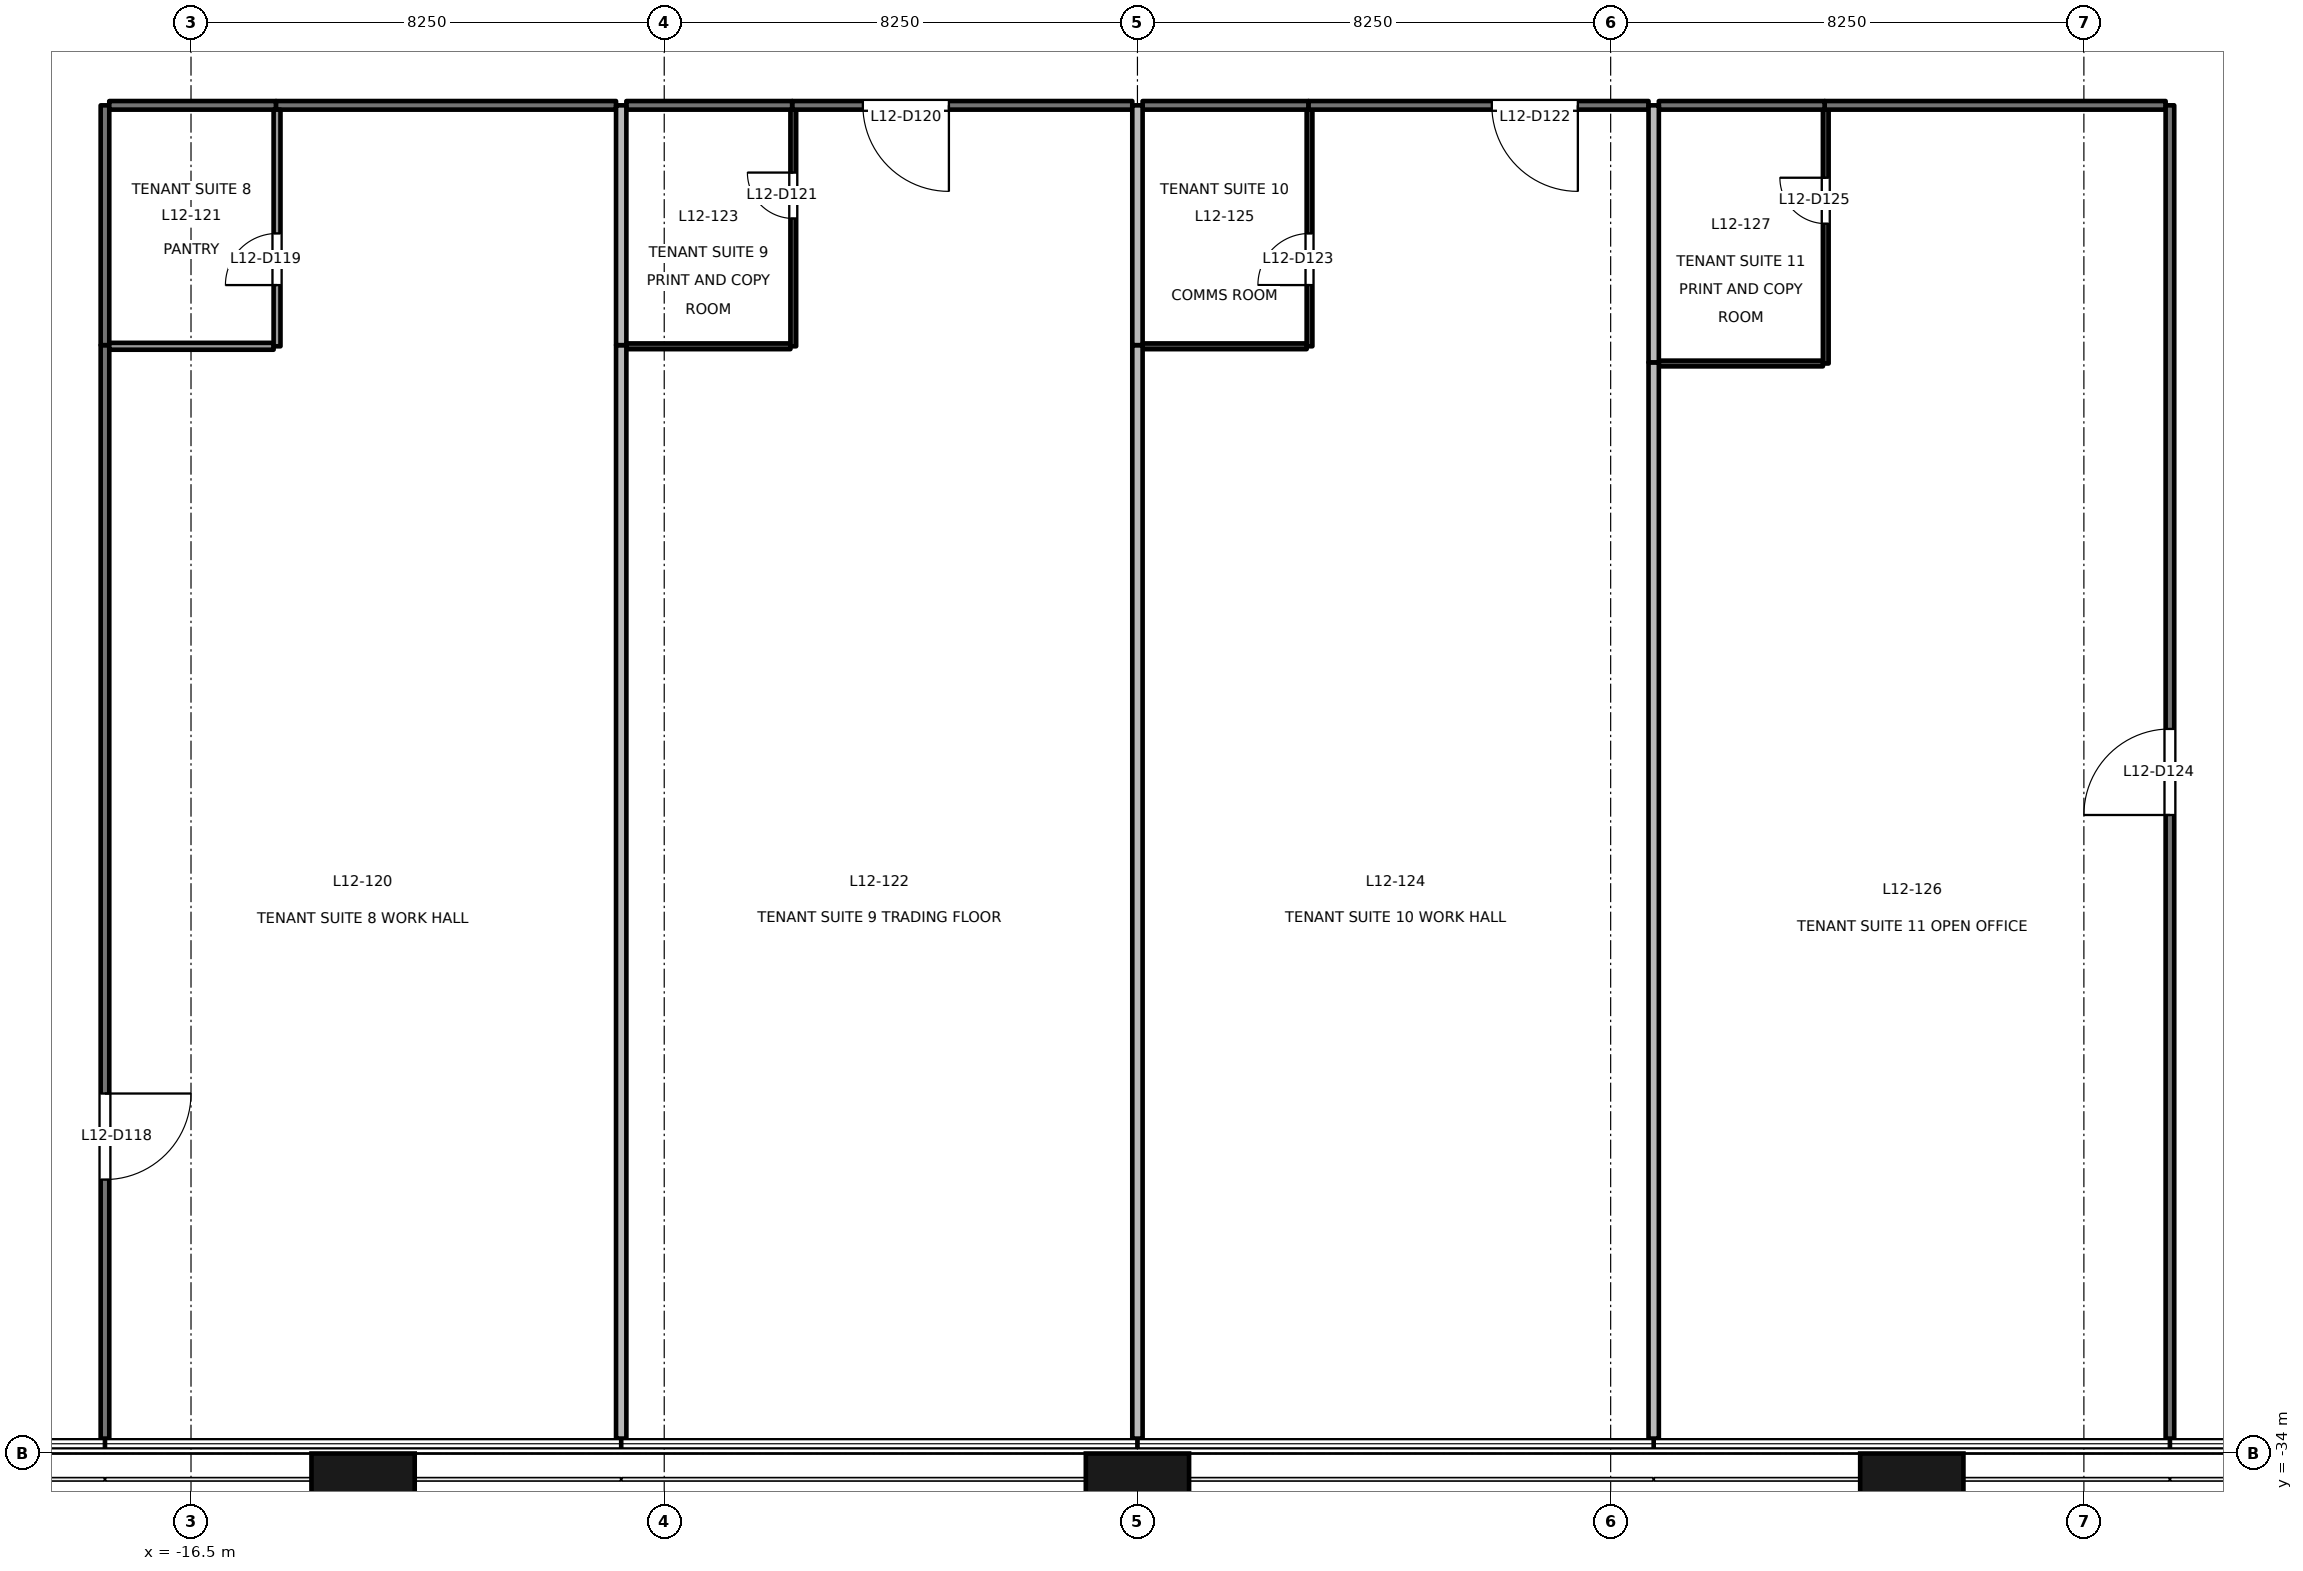
"""IFC4 building model, lengths in metres.
Left out: names, types, materials, properties, quantities, classifications, styles, units other than length and angle.
Written with IfcOpenShell. Run it as: python <this file> out.ifc"""

import sys

from ifc_helpers import new_model, si_unit, direction, frame, frame_2d, origin, origin_2d, place, context, subcontext, project, spatial, rectangle, extrude, element, fill, save


model = new_model("IFC4")
c1 = context("Model", 3, precision=1e-05, world=origin(), true_north=direction((0.0, 1.0)))
c2 = subcontext(c1, "Body", "Model", "MODEL_VIEW")
j1 = project(units=[si_unit("LENGTHUNIT", "METRE"), si_unit("PLANEANGLEUNIT", "RADIAN")], contexts=[c1])
p1 = place(None, origin())
s1 = spatial("IfcSite", under=j1, at=p1, CompositionType="ELEMENT")
p2 = place(p1, origin())
s2 = spatial("IfcBuilding", under=s1, at=p2, CompositionType="ELEMENT")
p3 = place(p2, frame((0.0, 0.0, 57.0)))
s3 = spatial("IfcBuildingStorey", under=s2, at=p3, CompositionType="ELEMENT", Elevation=57.0)
for number, where, z_axis, x_axis in (
    (1, (-13.5, -34.9, -0.2), (0.0, 0.0, 1.0), (1.0, 0.0, 0.0)),
    (2, (0.0, -34.9, -0.2), (0.0, 0.0, 1.0), (1.0, 0.0, 0.0)),
    (3, (13.5, -34.9, -0.2), (0.0, 0.0, 1.0), (1.0, 0.0, 0.0)),
):
    element("IfcColumn", number, at=place(p3, frame(where, z_axis=z_axis, x_axis=x_axis)), inside=s3, PredefinedType="COLUMN", context=c2, shape_type="SweptSolid", body=[
        extrude(rectangle(XDim=1.8, YDim=1.8, at=origin_2d()), origin(), (0.0, 0.0, 1.0), 4.1),
    ])
p4 = place(p3, frame((-18.0, -14.68, 0.0), z_axis=(0.0, 0.0, 1.0), x_axis=(0.0, -1.0, 0.0)))
e4 = element("IfcWall", 4, at=p4, inside=s3, PredefinedType="PARTITIONING", context=c2, shape_type="SweptSolid", body=[
    extrude(rectangle(XDim=19.06, YDim=0.15, at=frame_2d((9.53, 0.0))), origin(), (0.0, 0.0, 1.0), 2.5),
])
p5 = place(p4, frame((13.045, 0.0, 0.0)))
e5 = element("IfcOpeningElement", 5, at=p5, cuts=e4, PredefinedType="OPENING", context=c2, shape_type="SweptSolid", body=[
    extrude(rectangle(XDim=1.5, YDim=2.1, at=frame_2d((0.75, 1.05))), frame((0.0, 0.085, 0.0), z_axis=(0.0, -1.0, 0.0), x_axis=(1.0, 0.0, 0.0)), (0.0, 0.0, 1.0), 0.171),
])
p6 = place(p3, frame((-9.09, -10.5, 0.0), z_axis=(0.0, 0.0, 1.0), x_axis=(-1.0, 0.0, 0.0)))
e6 = element("IfcWall", 6, at=p6, inside=s3, PredefinedType="PARTITIONING", context=c2, shape_type="SweptSolid", body=[
    extrude(rectangle(XDim=5.93, YDim=0.15, at=frame_2d((2.965, 0.0))), origin(), (0.0, 0.0, 1.0), 2.9),
])
p7 = place(p3, frame((-18.0, -10.5, 0.0), z_axis=(0.0, 0.0, 1.0), x_axis=(0.0, -1.0, 0.0)))
e7 = element("IfcWall", 7, at=p7, inside=s3, PredefinedType="PARTITIONING", context=c2, shape_type="SweptSolid", body=[
    extrude(rectangle(XDim=4.18, YDim=0.15, at=frame_2d((2.09, 0.0))), origin(), (0.0, 0.0, 1.0), 2.5),
])
p8 = place(p3, frame((-15.02, -10.5, 0.0), z_axis=(0.0, 0.0, 1.0), x_axis=(-1.0, 0.0, 0.0)))
e8 = element("IfcWall", 8, at=p8, inside=s3, PredefinedType="PARTITIONING", context=c2, shape_type="SweptSolid", body=[
    extrude(rectangle(XDim=2.905, YDim=0.15, at=frame_2d((1.453, 0.0))), origin(), (0.0, 0.0, 1.0), 2.5),
])
p9 = place(p3, frame((-0.09, -10.5, 0.0), z_axis=(0.0, 0.0, 1.0), x_axis=(-1.0, 0.0, 0.0)))
e9 = element("IfcWall", 9, at=p9, inside=s3, PredefinedType="PARTITIONING", context=c2, shape_type="SweptSolid", body=[
    extrude(rectangle(XDim=5.93, YDim=0.15, at=frame_2d((2.965, 0.0))), origin(), (0.0, 0.0, 1.0), 2.9),
])
p10 = place(p9, frame((3.197, 0.0, 0.0)))
e10 = element("IfcOpeningElement", 10, at=p10, cuts=e9, PredefinedType="OPENING", context=c2, shape_type="SweptSolid", body=[
    extrude(rectangle(XDim=1.5, YDim=2.1, at=frame_2d((0.75, 1.05))), frame((0.0, 0.085, 0.0), z_axis=(0.0, -1.0, 0.0), x_axis=(1.0, 0.0, 0.0)), (0.0, 0.0, 1.0), 0.171),
])
p11 = place(p3, frame((-6.02, -10.5, 0.0), z_axis=(0.0, 0.0, 1.0), x_axis=(-1.0, 0.0, 0.0)))
e11 = element("IfcWall", 11, at=p11, inside=s3, PredefinedType="PARTITIONING", context=c2, shape_type="SweptSolid", body=[
    extrude(rectangle(XDim=2.89, YDim=0.15, at=frame_2d((1.445, 0.0))), origin(), (0.0, 0.0, 1.0), 2.9),
])
p12 = place(p3, frame((8.91, -10.5, 0.0), z_axis=(0.0, 0.0, 1.0), x_axis=(-1.0, 0.0, 0.0)))
e12 = element("IfcWall", 12, at=p12, inside=s3, PredefinedType="PARTITIONING", context=c2, shape_type="SweptSolid", body=[
    extrude(rectangle(XDim=5.93, YDim=0.15, at=frame_2d((2.965, 0.0))), origin(), (0.0, 0.0, 1.0), 2.9),
])
p13 = place(p12, frame((1.232, 0.0, 0.0)))
e13 = element("IfcOpeningElement", 13, at=p13, cuts=e12, PredefinedType="OPENING", context=c2, shape_type="SweptSolid", body=[
    extrude(rectangle(XDim=1.5, YDim=2.1, at=frame_2d((0.75, 1.05))), frame((0.0, 0.085, 0.0), z_axis=(0.0, -1.0, 0.0), x_axis=(1.0, 0.0, 0.0)), (0.0, 0.0, 1.0), 0.171),
])
p14 = place(p3, frame((2.98, -10.5, 0.0), z_axis=(0.0, 0.0, 1.0), x_axis=(-1.0, 0.0, 0.0)))
e14 = element("IfcWall", 14, at=p14, inside=s3, PredefinedType="PARTITIONING", context=c2, shape_type="SweptSolid", body=[
    extrude(rectangle(XDim=2.89, YDim=0.15, at=frame_2d((1.445, 0.0))), origin(), (0.0, 0.0, 1.0), 2.9),
])
p15 = place(p3, frame((17.925, -10.5, 0.0), z_axis=(0.0, 0.0, 1.0), x_axis=(-1.0, 0.0, 0.0)))
e15 = element("IfcWall", 15, at=p15, inside=s3, PredefinedType="PARTITIONING", context=c2, shape_type="SweptSolid", body=[
    extrude(rectangle(XDim=5.945, YDim=0.15, at=frame_2d((2.973, 0.0))), origin(), (0.0, 0.0, 1.0), 2.5),
])
p16 = place(p3, frame((18.0, -33.74, 0.0), z_axis=(0.0, 0.0, 1.0), x_axis=(0.0, 1.0, 0.0)))
e16 = element("IfcWall", 16, at=p16, inside=s3, PredefinedType="PARTITIONING", context=c2, shape_type="SweptSolid", body=[
    extrude(rectangle(XDim=23.24, YDim=0.15, at=frame_2d((11.62, 0.0))), origin(), (0.0, 0.0, 1.0), 2.5),
])
p17 = place(p16, frame((10.87, 0.0, 0.0)))
e17 = element("IfcOpeningElement", 17, at=p17, cuts=e16, PredefinedType="OPENING", context=c2, shape_type="SweptSolid", body=[
    extrude(rectangle(XDim=1.5, YDim=2.1, at=frame_2d((0.75, 1.05))), frame((0.0, 0.085, 0.0), z_axis=(0.0, -1.0, 0.0), x_axis=(1.0, 0.0, 0.0)), (0.0, 0.0, 1.0), 0.171),
])
p18 = place(p3, frame((11.98, -10.5, 0.0), z_axis=(0.0, 0.0, 1.0), x_axis=(-1.0, 0.0, 0.0)))
e18 = element("IfcWall", 18, at=p18, inside=s3, PredefinedType="PARTITIONING", context=c2, shape_type="SweptSolid", body=[
    extrude(rectangle(XDim=2.89, YDim=0.15, at=frame_2d((1.445, 0.0))), origin(), (0.0, 0.0, 1.0), 2.9),
])
p19 = place(p3, frame((-17.925, -14.7, 0.0), z_axis=(0.0, 0.0, 1.0), x_axis=(1.0, 0.0, 0.0)))
e19 = element("IfcWall", 19, at=p19, inside=s3, PredefinedType="PARTITIONING", context=c2, shape_type="SweptSolid", body=[
    extrude(rectangle(XDim=2.865, YDim=0.12, at=frame_2d((1.433, 0.0))), origin(), (0.0, 0.0, 1.0), 2.5),
])
p20 = place(p3, frame((-15.0, -14.7, 0.0), z_axis=(0.0, 0.0, 1.0), x_axis=(0.0, 1.0, 0.0)))
e20 = element("IfcWall", 20, at=p20, inside=s3, PredefinedType="PARTITIONING", context=c2, shape_type="SweptSolid", body=[
    extrude(rectangle(XDim=4.125, YDim=0.12, at=frame_2d((2.062, 0.0))), origin(), (0.0, 0.0, 1.0), 3.9),
])
p21 = place(p20, frame((1.067, 0.0, 0.0)))
e21 = element("IfcOpeningElement", 21, at=p21, cuts=e20, PredefinedType="OPENING", context=c2, shape_type="SweptSolid", body=[
    extrude(rectangle(XDim=0.9, YDim=2.1, at=frame_2d((0.45, 1.05))), frame((0.0, 0.071, 0.0), z_axis=(0.0, -1.0, 0.0), x_axis=(1.0, 0.0, 0.0)), (0.0, 0.0, 1.0), 0.141),
])
p22 = place(p3, frame((-9.0, -14.68, 0.0), z_axis=(0.0, 0.0, 1.0), x_axis=(0.0, -1.0, 0.0)))
e22 = element("IfcWall", 22, at=p22, inside=s3, PredefinedType="PARTITIONING", context=c2, shape_type="SweptSolid", body=[
    extrude(rectangle(XDim=19.06, YDim=0.18, at=frame_2d((9.53, 0.0))), origin(), (0.0, 0.0, 1.0), 2.9),
])
p23 = place(p3, frame((-9.0, -10.5, 0.0), z_axis=(0.0, 0.0, 1.0), x_axis=(0.0, -1.0, 0.0)))
e23 = element("IfcWall", 23, at=p23, inside=s3, PredefinedType="PARTITIONING", context=c2, shape_type="SweptSolid", body=[
    extrude(rectangle(XDim=4.18, YDim=0.18, at=frame_2d((2.09, 0.0))), origin(), (0.0, 0.0, 1.0), 2.9),
])
p24 = place(p3, frame((-8.91, -14.7, 0.0), z_axis=(0.0, 0.0, 1.0), x_axis=(1.0, 0.0, 0.0)))
e24 = element("IfcWall", 24, at=p24, inside=s3, PredefinedType="PARTITIONING", context=c2, shape_type="SweptSolid", body=[
    extrude(rectangle(XDim=2.86, YDim=0.1, at=frame_2d((1.43, 0.0))), origin(), (0.0, 0.0, 1.0), 2.9),
])
p25 = place(p3, frame((-6.0, -14.7, 0.0), z_axis=(0.0, 0.0, 1.0), x_axis=(0.0, 1.0, 0.0)))
e25 = element("IfcWall", 25, at=p25, inside=s3, PredefinedType="PARTITIONING", context=c2, shape_type="SweptSolid", body=[
    extrude(rectangle(XDim=4.125, YDim=0.1, at=frame_2d((2.062, 0.0))), origin(), (0.0, 0.0, 1.0), 3.9),
])
p26 = place(p25, frame((2.228, 0.0, 0.0)))
e26 = element("IfcOpeningElement", 26, at=p26, cuts=e25, PredefinedType="OPENING", context=c2, shape_type="SweptSolid", body=[
    extrude(rectangle(XDim=0.8, YDim=2.1, at=frame_2d((0.4, 1.05))), frame((0.0, 0.061, 0.0), z_axis=(0.0, -1.0, 0.0), x_axis=(1.0, 0.0, 0.0)), (0.0, 0.0, 1.0), 0.121),
])
p27 = place(p3, frame((0.0, -14.68, 0.0), z_axis=(0.0, 0.0, 1.0), x_axis=(0.0, -1.0, 0.0)))
e27 = element("IfcWall", 27, at=p27, inside=s3, PredefinedType="PARTITIONING", context=c2, shape_type="SweptSolid", body=[
    extrude(rectangle(XDim=19.06, YDim=0.18, at=frame_2d((9.53, 0.0))), origin(), (0.0, 0.0, 1.0), 2.9),
])
p28 = place(p3, frame((0.0, -10.5, 0.0), z_axis=(0.0, 0.0, 1.0), x_axis=(0.0, -1.0, 0.0)))
e28 = element("IfcWall", 28, at=p28, inside=s3, PredefinedType="PARTITIONING", context=c2, shape_type="SweptSolid", body=[
    extrude(rectangle(XDim=4.18, YDim=0.18, at=frame_2d((2.09, 0.0))), origin(), (0.0, 0.0, 1.0), 2.9),
])
p29 = place(p3, frame((0.09, -14.7, 0.0), z_axis=(0.0, 0.0, 1.0), x_axis=(1.0, 0.0, 0.0)))
e29 = element("IfcWall", 29, at=p29, inside=s3, PredefinedType="PARTITIONING", context=c2, shape_type="SweptSolid", body=[
    extrude(rectangle(XDim=2.86, YDim=0.1, at=frame_2d((1.43, 0.0))), origin(), (0.0, 0.0, 1.0), 2.9),
])
p30 = place(p3, frame((3.0, -14.7, 0.0), z_axis=(0.0, 0.0, 1.0), x_axis=(0.0, 1.0, 0.0)))
e30 = element("IfcWall", 30, at=p30, inside=s3, PredefinedType="PARTITIONING", context=c2, shape_type="SweptSolid", body=[
    extrude(rectangle(XDim=4.125, YDim=0.1, at=frame_2d((2.062, 0.0))), origin(), (0.0, 0.0, 1.0), 3.9),
])
p31 = place(p30, frame((1.067, 0.0, 0.0)))
e31 = element("IfcOpeningElement", 31, at=p31, cuts=e30, PredefinedType="OPENING", context=c2, shape_type="SweptSolid", body=[
    extrude(rectangle(XDim=0.9, YDim=2.1, at=frame_2d((0.45, 1.05))), frame((0.0, 0.061, 0.0), z_axis=(0.0, -1.0, 0.0), x_axis=(1.0, 0.0, 0.0)), (0.0, 0.0, 1.0), 0.121),
])
p32 = place(p3, frame((9.0, -14.98, 0.0), z_axis=(0.0, 0.0, 1.0), x_axis=(0.0, -1.0, 0.0)))
e32 = element("IfcWall", 32, at=p32, inside=s3, PredefinedType="PARTITIONING", context=c2, shape_type="SweptSolid", body=[
    extrude(rectangle(XDim=18.76, YDim=0.18, at=frame_2d((9.38, 0.0))), origin(), (0.0, 0.0, 1.0), 2.9),
])
p33 = place(p3, frame((9.0, -10.5, 0.0), z_axis=(0.0, 0.0, 1.0), x_axis=(0.0, -1.0, 0.0)))
e33 = element("IfcWall", 33, at=p33, inside=s3, PredefinedType="PARTITIONING", context=c2, shape_type="SweptSolid", body=[
    extrude(rectangle(XDim=4.48, YDim=0.18, at=frame_2d((2.24, 0.0))), origin(), (0.0, 0.0, 1.0), 2.9),
])
p34 = place(p3, frame((9.09, -15.0, 0.0), z_axis=(0.0, 0.0, 1.0), x_axis=(1.0, 0.0, 0.0)))
e34 = element("IfcWall", 34, at=p34, inside=s3, PredefinedType="PARTITIONING", context=c2, shape_type="SweptSolid", body=[
    extrude(rectangle(XDim=2.86, YDim=0.1, at=frame_2d((1.43, 0.0))), origin(), (0.0, 0.0, 1.0), 2.9),
])
p35 = place(p3, frame((12.0, -15.0, 0.0), z_axis=(0.0, 0.0, 1.0), x_axis=(0.0, 1.0, 0.0)))
e35 = element("IfcWall", 35, at=p35, inside=s3, PredefinedType="PARTITIONING", context=c2, shape_type="SweptSolid", body=[
    extrude(rectangle(XDim=4.425, YDim=0.1, at=frame_2d((2.212, 0.0))), origin(), (0.0, 0.0, 1.0), 3.9),
])
p36 = place(p35, frame((2.438, 0.0, 0.0)))
e36 = element("IfcOpeningElement", 36, at=p36, cuts=e35, PredefinedType="OPENING", context=c2, shape_type="SweptSolid", body=[
    extrude(rectangle(XDim=0.8, YDim=2.1, at=frame_2d((0.4, 1.05))), frame((0.0, 0.061, 0.0), z_axis=(0.0, -1.0, 0.0), x_axis=(1.0, 0.0, 0.0)), (0.0, 0.0, 1.0), 0.121),
])
p37 = place(p5, origin())
e37 = element("IfcDoor", 37, at=p37, inside=s3, OperationType="DOUBLE_DOOR_SINGLE_SWING", PredefinedType="DOOR", context=c2, shape_type="SweptSolid", body=[
    extrude(rectangle(XDim=1.5, YDim=2.1, at=frame_2d((0.75, 1.05))), frame((0.0, 0.025, 0.0), z_axis=(0.0, -1.0, 0.0), x_axis=(1.0, 0.0, 0.0)), (0.0, 0.0, 1.0), 0.05),
])
fill(e5, e37)
p38 = place(p21, origin())
e38 = element("IfcDoor", 38, at=p38, inside=s3, OperationType="SINGLE_SWING_LEFT", PredefinedType="DOOR", context=c2, shape_type="SweptSolid", body=[
    extrude(rectangle(XDim=0.9, YDim=2.1, at=frame_2d((0.45, 1.05))), frame((0.0, 0.025, 0.0), z_axis=(0.0, -1.0, 0.0), x_axis=(1.0, 0.0, 0.0)), (0.0, 0.0, 1.0), 0.05),
])
fill(e21, e38)
p39 = place(p10, origin())
e39 = element("IfcDoor", 39, at=p39, inside=s3, OperationType="DOUBLE_DOOR_SINGLE_SWING", PredefinedType="DOOR", context=c2, shape_type="SweptSolid", body=[
    extrude(rectangle(XDim=1.5, YDim=2.1, at=frame_2d((0.75, 1.05))), frame((0.0, 0.025, 0.0), z_axis=(0.0, -1.0, 0.0), x_axis=(1.0, 0.0, 0.0)), (0.0, 0.0, 1.0), 0.05),
])
fill(e10, e39)
p40 = place(p26, origin())
e40 = element("IfcDoor", 40, at=p40, inside=s3, OperationType="SINGLE_SWING_RIGHT", PredefinedType="DOOR", context=c2, shape_type="SweptSolid", body=[
    extrude(rectangle(XDim=0.8, YDim=2.1, at=frame_2d((0.4, 1.05))), frame((0.0, 0.025, 0.0), z_axis=(0.0, -1.0, 0.0), x_axis=(1.0, 0.0, 0.0)), (0.0, 0.0, 1.0), 0.05),
])
fill(e26, e40)
p41 = place(p13, origin())
e41 = element("IfcDoor", 41, at=p41, inside=s3, OperationType="DOUBLE_DOOR_SINGLE_SWING", PredefinedType="DOOR", context=c2, shape_type="SweptSolid", body=[
    extrude(rectangle(XDim=1.5, YDim=2.1, at=frame_2d((0.75, 1.05))), frame((0.0, 0.025, 0.0), z_axis=(0.0, -1.0, 0.0), x_axis=(1.0, 0.0, 0.0)), (0.0, 0.0, 1.0), 0.05),
])
fill(e13, e41)
p42 = place(p31, origin())
e42 = element("IfcDoor", 42, at=p42, inside=s3, OperationType="SINGLE_SWING_LEFT", PredefinedType="DOOR", context=c2, shape_type="SweptSolid", body=[
    extrude(rectangle(XDim=0.9, YDim=2.1, at=frame_2d((0.45, 1.05))), frame((0.0, 0.025, 0.0), z_axis=(0.0, -1.0, 0.0), x_axis=(1.0, 0.0, 0.0)), (0.0, 0.0, 1.0), 0.05),
])
fill(e31, e42)
p43 = place(p17, origin())
e43 = element("IfcDoor", 43, at=p43, inside=s3, OperationType="DOUBLE_DOOR_SINGLE_SWING", PredefinedType="DOOR", context=c2, shape_type="SweptSolid", body=[
    extrude(rectangle(XDim=1.5, YDim=2.1, at=frame_2d((0.75, 1.05))), frame((0.0, 0.025, 0.0), z_axis=(0.0, -1.0, 0.0), x_axis=(1.0, 0.0, 0.0)), (0.0, 0.0, 1.0), 0.05),
])
fill(e17, e43)
p44 = place(p36, origin())
e44 = element("IfcDoor", 44, at=p44, inside=s3, OperationType="SINGLE_SWING_RIGHT", PredefinedType="DOOR", context=c2, shape_type="SweptSolid", body=[
    extrude(rectangle(XDim=0.8, YDim=2.1, at=frame_2d((0.4, 1.05))), frame((0.0, 0.025, 0.0), z_axis=(0.0, -1.0, 0.0), x_axis=(1.0, 0.0, 0.0)), (0.0, 0.0, 1.0), 0.05),
])
fill(e36, e44)
save(model, sys.argv[1])
